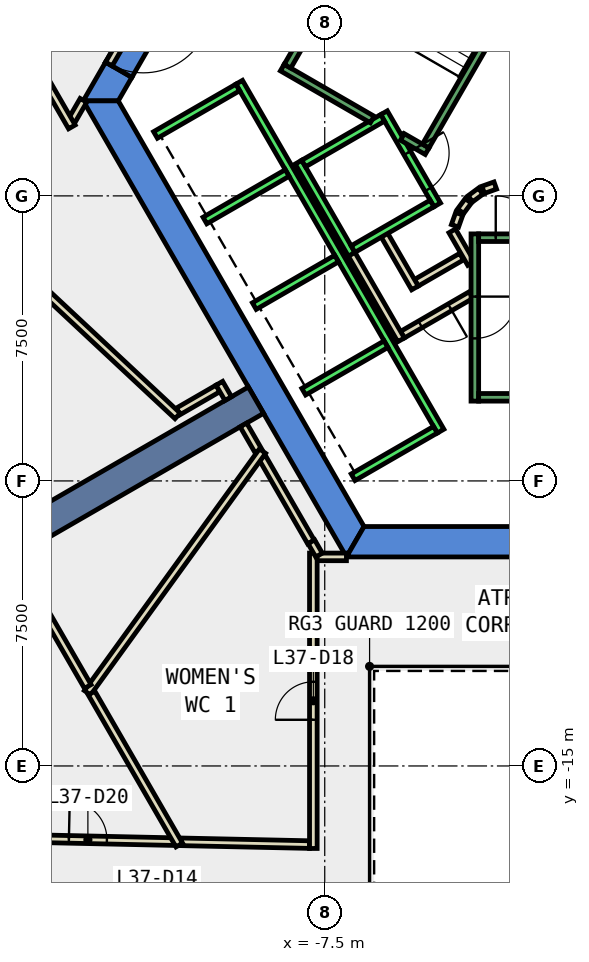
"""IFC4 building model, lengths in metres.
Left out: names, types, materials, properties, quantities, classifications, styles, units other than length and angle.
Written with IfcOpenShell. Run it as: python <this file> out.ifc"""

import sys

from ifc_helpers import new_model, si_unit, direction, frame, frame_2d, origin, place, context, subcontext, project, spatial, polyline, rectangle, outline, extrude, element, fill, save


model = new_model("IFC4")
c1 = context("Model", 3, precision=1e-05, world=origin(), true_north=direction((0.0, 1.0)))
c2 = subcontext(c1, "Body", "Model", "MODEL_VIEW")
j1 = project(units=[si_unit("LENGTHUNIT", "METRE"), si_unit("PLANEANGLEUNIT", "RADIAN")], contexts=[c1])
p1 = place(None, origin())
s1 = spatial("IfcSite", under=j1, at=p1, CompositionType="ELEMENT")
p2 = place(p1, origin())
s2 = spatial("IfcBuilding", under=s1, at=p2, CompositionType="ELEMENT")
p3 = place(p2, frame((0.0, 0.0, 167.6)))
s3 = spatial("IfcBuildingStorey", under=s2, at=p3, CompositionType="ELEMENT", Elevation=167.6)
p4 = place(p3, frame((0.0, 0.0, -0.4)))
e1 = element("IfcWall", 1, at=p4, inside=s3, PredefinedType="SHEAR", context=c2, shape_type="SweptSolid", body=[
    extrude(outline(polyline([(-12.575, 3.12), (-13.267, 3.52), (-13.856, 2.5), (-12.933, 2.5), (-12.575, 3.12)])), origin(), (0.0, 0.0, 1.0), 4.2),
])
p5 = place(p3, frame((0.0, 0.0, 3.6)))
e2 = element("IfcWall", 2, at=p5, inside=s3, PredefinedType="SHEAR", context=c2, shape_type="SweptSolid", body=[
    extrude(outline(polyline([(-13.267, 3.52), (-12.575, 3.12), (-11.575, 4.852), (-12.267, 5.252), (-13.267, 3.52)])), origin(), (0.0, 0.0, 1.0), 0.2),
])
p6 = place(p3, frame((0.0, 0.0, -0.4)))
e3 = element("IfcWall", 3, at=p6, inside=s3, PredefinedType="SHEAR", context=c2, shape_type="SweptSolid", body=[
    extrude(outline(polyline([(-13.856, 2.5), (-6.928, -9.5), (-6.466, -8.7), (-12.933, 2.5), (-13.856, 2.5)])), origin(), (0.0, 0.0, 1.0), 4.2),
])
p7 = place(p3, frame((0.0, 0.0, -0.4)))
e4 = element("IfcWall", 4, at=p7, inside=s3, PredefinedType="SHEAR", context=c2, shape_type="SweptSolid", body=[
    extrude(outline(polyline([(3.75, -9.5), (3.75, -8.7), (-6.466, -8.7), (-6.928, -9.5), (3.75, -9.5)])), origin(), (0.0, 0.0, 1.0), 4.2),
])
p8 = place(p3, frame((-9.31, -5.375, -0.4), z_axis=(0.0, 0.0, 1.0), x_axis=(-0.866017533419, -0.500013631625, 0.0)))
e5 = element("IfcWall", 5, at=p8, inside=s3, PredefinedType="SHEAR", context=c2, shape_type="SweptSolid", body=[
    extrude(rectangle(XDim=9.0, YDim=0.8, at=frame_2d((4.5, 0.0))), origin(), (0.0, 0.0, 1.0), 4.2),
])
p9 = place(p3, frame((-13.85, 2.514, 0.0), z_axis=(0.0, 0.0, 1.0), x_axis=(-0.500418219013, -0.865783810244, 0.0)))
e6 = element("IfcWall", 6, at=p9, inside=s3, PredefinedType="PARTITIONING", context=c2, shape_type="SweptSolid", body=[
    extrude(rectangle(XDim=0.607, YDim=0.2, at=frame_2d((0.304, 0.0))), origin(), (0.0, 0.0, 1.0), 3.8),
])
p10 = place(p3, frame((-14.154, 1.815, 0.0), z_axis=(0.0, 0.0, 1.0), x_axis=(-0.500038857296, 0.866002968352, 0.0)))
e7 = element("IfcWall", 7, at=p10, inside=s3, PredefinedType="PARTITIONING", context=c2, shape_type="SweptSolid", body=[
    extrude(rectangle(XDim=3.34, YDim=0.2, at=frame_2d((1.67, 0.0))), origin(), (0.0, 0.0, 1.0), 3.8),
])
p11 = place(p3, frame((-11.278, -16.996, 0.0), z_axis=(0.0, 0.0, 1.0), x_axis=(0.999766613119, -0.021603687022, 0.0)))
e8 = element("IfcWall", 8, at=p11, inside=s3, PredefinedType="PARTITIONING", context=c2, shape_type="SweptSolid", body=[
    extrude(rectangle(XDim=3.379, YDim=0.2, at=frame_2d((1.689, 0.0))), origin(), (0.0, 0.0, 1.0), 3.8),
])
p12 = place(p3, frame((-15.987, -16.893, 0.0), z_axis=(0.0, 0.0, 1.0), x_axis=(0.999764376572, -0.021706942174, 0.0)))
e9 = element("IfcWall", 9, at=p12, inside=s3, PredefinedType="PARTITIONING", context=c2, shape_type="SweptSolid", body=[
    extrude(rectangle(XDim=4.51, YDim=0.2, at=frame_2d((2.255, 0.0))), origin(), (0.0, 0.0, 1.0), 3.8),
])
p13 = place(p12, frame((1.755, 0.0, 0.0)))
e10 = element("IfcOpeningElement", 10, at=p13, cuts=e9, PredefinedType="OPENING", context=c2, shape_type="SweptSolid", body=[
    extrude(rectangle(XDim=1.0, YDim=2.1, at=frame_2d((0.5, 1.05))), frame((0.0, 0.11, 0.0), z_axis=(0.0, -1.0, 0.0), x_axis=(1.0, 0.0, 0.0)), (0.0, 0.0, 1.0), 0.22),
])
p14 = place(p3, frame((-3.9, -1.599, 0.0), z_axis=(0.0, 0.0, 1.0), x_axis=(-0.865969445389, -0.500096910261, 0.0)))
e11 = element("IfcWall", 11, at=p14, inside=s3, PredefinedType="PARTITIONING", context=c2, shape_type="SweptSolid", body=[
    extrude(rectangle(XDim=1.373, YDim=0.2, at=frame_2d((0.687, 0.0))), origin(), (0.0, 0.0, 1.0), 3.8),
])
p15 = place(p3, frame((-5.126, -2.422, 0.0), z_axis=(0.0, 0.0, 1.0), x_axis=(-0.500062241894, 0.865989465428, 0.0)))
e12 = element("IfcWall", 12, at=p15, inside=s3, PredefinedType="PARTITIONING", context=c2, shape_type="SweptSolid", body=[
    extrude(rectangle(XDim=1.7, YDim=0.2, at=frame_2d((0.85, 0.0))), origin(), (0.0, 0.0, 1.0), 3.8),
])
p16 = place(p3, frame((-3.65, -2.61, 0.0), z_axis=(0.0, 0.0, 1.0), x_axis=(-0.866072462134, -0.499918483688, 0.0)))
e13 = element("IfcWall", 13, at=p16, inside=s3, PredefinedType="PARTITIONING", context=c2, shape_type="SweptSolid", body=[
    extrude(rectangle(XDim=2.084, YDim=0.2, at=frame_2d((1.042, 0.0))), origin(), (0.0, 0.0, 1.0), 3.8),
])
p17 = place(p16, frame((0.642, 0.0, 0.0)))
e14 = element("IfcOpeningElement", 14, at=p17, cuts=e13, PredefinedType="OPENING", context=c2, shape_type="SweptSolid", body=[
    extrude(rectangle(XDim=0.9, YDim=2.1, at=frame_2d((0.45, 1.05))), frame((0.0, 0.11, 0.0), z_axis=(0.0, -1.0, 0.0), x_axis=(1.0, 0.0, 0.0)), (0.0, 0.0, 1.0), 0.22),
])
p18 = place(p3, frame((-5.492, -3.788, 0.0), z_axis=(0.0, 0.0, 1.0), x_axis=(-0.500008949224, 0.866020236886, 0.0)))
e15 = element("IfcWall", 15, at=p18, inside=s3, PredefinedType="PARTITIONING", context=c2, shape_type="SweptSolid", body=[
    extrude(rectangle(XDim=2.68, YDim=0.2, at=frame_2d((1.34, 0.0))), origin(), (0.0, 0.0, 1.0), 3.8),
])
p19 = place(p3, frame((-4.145, -0.92, 0.0), z_axis=(0.0, 0.0, 1.0), x_axis=(0.499743786207, -0.866173278362, 0.0)))
e16 = element("IfcWall", 16, at=p19, inside=s3, PredefinedType="PARTITIONING", context=c2, shape_type="SweptSolid", body=[
    extrude(rectangle(XDim=0.991, YDim=0.2, at=frame_2d((0.495, 0.0))), origin(), (0.0, 0.0, 1.0), 3.8),
])
p20 = place(p3, frame((-2.771, 4.7, 0.0), z_axis=(0.0, 0.0, 1.0), x_axis=(0.499969479948, -0.866043023828, 0.0)))
e17 = element("IfcWall", 17, at=p20, inside=s3, PredefinedType="PARTITIONING", context=c2, shape_type="SweptSolid", body=[
    extrude(rectangle(XDim=4.99, YDim=0.2, at=frame_2d((2.495, 0.0))), origin(), (0.0, 0.0, 1.0), 3.8),
])
p21 = place(p20, frame((1.945, 0.0, 0.0)))
e18 = element("IfcOpeningElement", 18, at=p21, cuts=e17, PredefinedType="OPENING", context=c2, shape_type="SweptSolid", body=[
    extrude(rectangle(XDim=1.0, YDim=2.1, at=frame_2d((0.5, 1.05))), frame((0.0, 0.11, 0.0), z_axis=(0.0, -1.0, 0.0), x_axis=(1.0, 0.0, 0.0)), (0.0, 0.0, 1.0), 0.22),
])
p22 = place(p3, frame((-3.012, 0.273, 0.0), z_axis=(0.0, 0.0, 1.0), x_axis=(-0.942280615813, -0.334824194261, 0.0)))
e19 = element("IfcWall", 19, at=p22, inside=s3, PredefinedType="PARTITIONING", context=c2, shape_type="SweptSolid", body=[
    extrude(rectangle(XDim=0.338, YDim=0.2, at=frame_2d((0.169, 0.0))), origin(), (0.0, 0.0, 1.0), 3.8),
])
p23 = place(p3, frame((-3.397, 0.124, 0.0), z_axis=(0.0, 0.0, 1.0), x_axis=(-0.804311165252, -0.594208338422, 0.0)))
e20 = element("IfcWall", 20, at=p23, inside=s3, PredefinedType="PARTITIONING", context=c2, shape_type="SweptSolid", body=[
    extrude(rectangle(XDim=0.338, YDim=0.2, at=frame_2d((0.169, 0.0))), origin(), (0.0, 0.0, 1.0), 3.8),
])
p24 = place(p3, frame((-3.723, -0.131, 0.0), z_axis=(0.0, 0.0, 1.0), x_axis=(-0.594675113454, -0.803966112121, 0.0)))
e21 = element("IfcWall", 21, at=p24, inside=s3, PredefinedType="PARTITIONING", context=c2, shape_type="SweptSolid", body=[
    extrude(rectangle(XDim=0.338, YDim=0.2, at=frame_2d((0.169, 0.0))), origin(), (0.0, 0.0, 1.0), 3.8),
])
p25 = place(p3, frame((-3.96, -0.47, 0.0), z_axis=(0.0, 0.0, 1.0), x_axis=(-0.334824194261, -0.942280615813, 0.0)))
e22 = element("IfcWall", 22, at=p25, inside=s3, PredefinedType="PARTITIONING", context=c2, shape_type="SweptSolid", body=[
    extrude(rectangle(XDim=0.338, YDim=0.2, at=frame_2d((0.169, 0.0))), origin(), (0.0, 0.0, 1.0), 3.8),
])
p26 = place(p3, frame((-7.722, -9.499, 0.0), z_axis=(0.0, 0.0, 1.0), x_axis=(1.0, 0.0, 0.0)))
e23 = element("IfcWall", 23, at=p26, inside=s3, PredefinedType="PARTITIONING", context=c2, shape_type="SweptSolid", body=[
    extrude(rectangle(XDim=0.793, YDim=0.2, at=frame_2d((0.396, 0.0))), origin(), (0.0, 0.0, 1.0), 3.8),
])
p27 = place(p3, frame((-7.8, -17.171, 0.0), z_axis=(0.0, 0.0, 1.0), x_axis=(0.0, 1.0, 0.0)))
e24 = element("IfcWall", 24, at=p27, inside=s3, PredefinedType="PARTITIONING", context=c2, shape_type="SweptSolid", body=[
    extrude(rectangle(XDim=7.772, YDim=0.2, at=frame_2d((3.886, 0.0))), origin(), (0.0, 0.0, 1.0), 3.8),
])
p28 = place(p27, frame((3.386, 0.0, 0.0)))
e25 = element("IfcOpeningElement", 25, at=p28, cuts=e24, PredefinedType="OPENING", context=c2, shape_type="SweptSolid", body=[
    extrude(rectangle(XDim=1.0, YDim=2.1, at=frame_2d((0.5, 1.05))), frame((0.0, 0.11, 0.0), z_axis=(0.0, -1.0, 0.0), x_axis=(1.0, 0.0, 0.0)), (0.0, 0.0, 1.0), 0.22),
])
p29 = place(p3, frame((-7.862, -9.107, 0.0), z_axis=(0.0, 0.0, 1.0), x_axis=(-0.499994038704, 0.866028845513, 0.0)))
e26 = element("IfcWall", 26, at=p29, inside=s3, PredefinedType="PARTITIONING", context=c2, shape_type="SweptSolid", body=[
    extrude(rectangle(XDim=2.568, YDim=0.2, at=frame_2d((1.284, 0.0))), origin(), (0.0, 0.0, 1.0), 3.8),
])
p30 = place(p3, frame((-7.65, -9.451, 0.0), z_axis=(0.0, 0.0, 1.0), x_axis=(-0.500297731093, 0.865853440406, 0.0)))
e27 = element("IfcWall", 27, at=p30, inside=s3, PredefinedType="PARTITIONING", context=c2, shape_type="SweptSolid", body=[
    extrude(rectangle(XDim=0.404, YDim=0.2, at=frame_2d((0.202, 0.0))), origin(), (0.0, 0.0, 1.0), 3.8),
])
p31 = place(p3, frame((-9.246, -6.71, 0.0), z_axis=(0.0, 0.0, 1.0), x_axis=(-0.499570510076, 0.86627322795, 0.0)))
e28 = element("IfcWall", 28, at=p31, inside=s3, PredefinedType="PARTITIONING", context=c2, shape_type="SweptSolid", body=[
    extrude(rectangle(XDim=0.788, YDim=0.2, at=frame_2d((0.394, 0.0))), origin(), (0.0, 0.0, 1.0), 3.8),
])
p32 = place(p3, frame((-10.31, -5.066, 0.0), z_axis=(0.0, 0.0, 1.0), x_axis=(-0.865587329375, -0.500758000661, 0.0)))
e29 = element("IfcWall", 29, at=p32, inside=s3, PredefinedType="PARTITIONING", context=c2, shape_type="SweptSolid", body=[
    extrude(rectangle(XDim=1.21, YDim=0.2, at=frame_2d((0.605, 0.0))), origin(), (0.0, 0.0, 1.0), 3.8),
])
p33 = place(p3, frame((-11.372, -5.79, 0.0), z_axis=(0.0, 0.0, 1.0), x_axis=(-0.730922728623, 0.682460229451, 0.0)))
e30 = element("IfcWall", 30, at=p33, inside=s3, PredefinedType="PARTITIONING", context=c2, shape_type="SweptSolid", body=[
    extrude(rectangle(XDim=9.924, YDim=0.2, at=frame_2d((4.962, 0.0))), origin(), (0.0, 0.0, 1.0), 3.8),
])
p34 = place(p3, frame((-13.744, -13.076, 0.0), z_axis=(0.0, 0.0, 1.0), x_axis=(0.586577314901, 0.809893235953, 0.0)))
e31 = element("IfcWall", 31, at=p34, inside=s3, PredefinedType="PARTITIONING", context=c2, shape_type="SweptSolid", body=[
    extrude(rectangle(XDim=7.854, YDim=0.2, at=frame_2d((3.927, 0.0))), origin(), (0.0, 0.0, 1.0), 3.8),
])
p35 = place(p3, frame((-11.328, -17.08, 0.0), z_axis=(0.0, 0.0, 1.0), x_axis=(-0.499972710878, 0.866041158593, 0.0)))
e32 = element("IfcWall", 32, at=p35, inside=s3, PredefinedType="PARTITIONING", context=c2, shape_type="SweptSolid", body=[
    extrude(rectangle(XDim=4.616, YDim=0.2, at=frame_2d((2.308, 0.0))), origin(), (0.0, 0.0, 1.0), 3.8),
])
p36 = place(p3, frame((-13.736, -12.909, 0.0), z_axis=(0.0, 0.0, 1.0), x_axis=(-0.49990810406, 0.866078453429, 0.0)))
e33 = element("IfcWall", 33, at=p36, inside=s3, PredefinedType="PARTITIONING", context=c2, shape_type="SweptSolid", body=[
    extrude(rectangle(XDim=3.908, YDim=0.2, at=frame_2d((1.954, 0.0))), origin(), (0.0, 0.0, 1.0), 3.8),
])
p37 = place(p3, frame((-12.18, 5.202, 0.0), z_axis=(0.0, 0.0, 1.0), x_axis=(-0.50002537861, -0.866010750942, 0.0)))
e34 = element("IfcWall", 34, at=p37, inside=s3, PredefinedType="PARTITIONING", context=c2, shape_type="SweptSolid", body=[
    extrude(rectangle(XDim=2.0, YDim=0.2, at=frame_2d((1.0, 0.0))), origin(), (0.0, 0.0, 1.0), 2.4),
])
p38 = place(p37, frame((0.19, 0.0, 0.0)))
e35 = element("IfcOpeningElement", 35, at=p38, cuts=e34, PredefinedType="OPENING", context=c2, shape_type="SweptSolid", body=[
    extrude(rectangle(XDim=1.8, YDim=2.1, at=frame_2d((0.9, 1.05))), frame((0.0, 0.11, 0.0), z_axis=(0.0, -1.0, 0.0), x_axis=(1.0, 0.0, 0.0)), (0.0, 0.0, 1.0), 0.22),
])
p39 = place(p3, frame((-10.04, -5.334, 0.0), z_axis=(0.0, 0.0, 1.0), x_axis=(-0.499405191234, 0.86636854454, 0.0)))
e36 = element("IfcWall", 36, at=p39, inside=s3, PredefinedType="PARTITIONING", context=c2, shape_type="SweptSolid", body=[
    extrude(rectangle(XDim=0.466, YDim=0.2, at=frame_2d((0.233, 0.0))), origin(), (0.0, 0.0, 1.0), 3.8),
])
p40 = place(p3, frame((-5.94, 2.188, 0.0), z_axis=(0.0, 0.0, 1.0), x_axis=(0.49994636267, -0.866056369097, 0.0)))
e37 = element("IfcWall", 37, at=p40, inside=s3, PredefinedType="STANDARD", context=c2, shape_type="SweptSolid", body=[
    extrude(rectangle(XDim=2.8, YDim=0.2, at=frame_2d((1.4, 0.0))), origin(), (0.0, 0.0, 1.0), 3.8),
])
p41 = place(p40, frame((1.225, 0.0, 0.0)))
e38 = element("IfcOpeningElement", 38, at=p41, cuts=e37, PredefinedType="OPENING", context=c2, shape_type="SweptSolid", body=[
    extrude(rectangle(XDim=1.1, YDim=2.1, at=frame_2d((0.55, 1.05))), frame((0.0, 0.11, 0.0), z_axis=(0.0, -1.0, 0.0), x_axis=(1.0, 0.0, 0.0)), (0.0, 0.0, 1.0), 0.22),
])
p42 = place(p3, frame((-8.192, 0.888, 0.0), z_axis=(0.0, 0.0, 1.0), x_axis=(0.49994636267, -0.866056369097, 0.0)))
e39 = element("IfcWall", 39, at=p42, inside=s3, PredefinedType="STANDARD", context=c2, shape_type="SweptSolid", body=[
    extrude(rectangle(XDim=2.8, YDim=0.2, at=frame_2d((1.4, 0.0))), origin(), (0.0, 0.0, 1.0), 3.8),
])
for number, where, z_axis, x_axis in (
    (40, (-5.977, 2.052, 0.0), (0.0, 0.0, 1.0), (-0.866, -0.5, 0.0)),
    (41, (-4.677, -0.2, 0.0), (0.0, 0.0, 1.0), (-0.866, -0.5, 0.0)),
):
    element("IfcWall", number, at=place(p3, frame(where, z_axis=z_axis, x_axis=x_axis)), inside=s3, PredefinedType="STANDARD", context=c2, shape_type="SweptSolid", body=[
        extrude(rectangle(XDim=2.399, YDim=0.2, at=frame_2d((1.2, 0.0))), origin(), (0.0, 0.0, 1.0), 3.8),
    ])
p43 = place(p3, frame((-9.751, 2.99, 0.0), z_axis=(0.0, 0.0, 1.0), x_axis=(0.50000090737, -0.866024879913, 0.0)))
e42 = element("IfcWall", 42, at=p43, inside=s3, PredefinedType="STANDARD", context=c2, shape_type="SweptSolid", body=[
    extrude(rectangle(XDim=10.6, YDim=0.2, at=frame_2d((5.3, 0.0))), origin(), (0.0, 0.0, 1.0), 3.8),
])
p44 = place(p3, frame((-9.788, 2.853, 0.0), z_axis=(0.0, 0.0, 1.0), x_axis=(-0.865998541277, -0.500046524342, 0.0)))
e43 = element("IfcWall", 43, at=p44, inside=s3, PredefinedType="STANDARD", context=c2, shape_type="SweptSolid", body=[
    extrude(rectangle(XDim=2.5, YDim=0.2, at=frame_2d((1.25, 0.0))), origin(), (0.0, 0.0, 1.0), 3.8),
])
for number, where, z_axis, x_axis in (
    (44, (-8.488, 0.602, 0.0), (0.0, 0.0, 1.0), (-0.866, -0.5, 0.0)),
    (45, (-7.188, -1.65, 0.0), (0.0, 0.0, 1.0), (-0.866, -0.5, 0.0)),
    (46, (-5.888, -3.902, 0.0), (0.0, 0.0, 1.0), (-0.866, -0.5, 0.0)),
    (47, (-4.588, -6.153, 0.0), (0.0, 0.0, 1.0), (-0.866, -0.5, 0.0)),
):
    element("IfcWall", number, at=place(p3, frame(where, z_axis=z_axis, x_axis=x_axis)), inside=s3, PredefinedType="STANDARD", context=c2, shape_type="SweptSolid", body=[
        extrude(rectangle(XDim=2.5, YDim=0.2, at=frame_2d((1.25, 0.0))), origin(), (0.0, 0.0, 1.0), 3.8),
    ])
p45 = place(p3, frame((-3.55, -1.0, 0.0), z_axis=(0.0, 0.0, 1.0), x_axis=(0.0, -1.0, 0.0)))
e48 = element("IfcWall", 48, at=p45, inside=s3, PredefinedType="STANDARD", context=c2, shape_type="SweptSolid", body=[
    extrude(rectangle(XDim=4.4, YDim=0.2, at=frame_2d((2.2, 0.0))), origin(), (0.0, 0.0, 1.0), 3.8),
])
p46 = place(p45, frame((1.65, 0.0, 0.0)))
e49 = element("IfcOpeningElement", 49, at=p46, cuts=e48, PredefinedType="OPENING", context=c2, shape_type="SweptSolid", body=[
    extrude(rectangle(XDim=1.1, YDim=2.2, at=frame_2d((0.55, 1.1))), frame((0.0, 0.11, 0.0), z_axis=(0.0, -1.0, 0.0), x_axis=(1.0, 0.0, 0.0)), (0.0, 0.0, 1.0), 0.22),
])
p47 = place(p3, frame((-3.45, -1.1, 0.0), z_axis=(0.0, 0.0, 1.0), x_axis=(1.0, 0.0, 0.0)))
e50 = element("IfcWall", 50, at=p47, inside=s3, PredefinedType="STANDARD", context=c2, shape_type="SweptSolid", body=[
    extrude(rectangle(XDim=6.9, YDim=0.2, at=frame_2d((3.45, 0.0))), origin(), (0.0, 0.0, 1.0), 3.8),
])
p48 = place(p47, frame((0.45, 0.0, 0.0)))
e51 = element("IfcOpeningElement", 51, at=p48, cuts=e50, PredefinedType="OPENING", context=c2, shape_type="SweptSolid", body=[
    extrude(rectangle(XDim=1.1, YDim=2.2, at=frame_2d((0.55, 1.1))), frame((0.0, 0.11, 0.0), z_axis=(0.0, -1.0, 0.0), x_axis=(1.0, 0.0, 0.0)), (0.0, 0.0, 1.0), 0.22),
])
p49 = place(p3, frame((-3.45, -5.3, 0.0), z_axis=(0.0, 0.0, 1.0), x_axis=(1.0, 0.0, 0.0)))
e52 = element("IfcWall", 52, at=p49, inside=s3, PredefinedType="STANDARD", context=c2, shape_type="SweptSolid", body=[
    extrude(rectangle(XDim=6.9, YDim=0.2, at=frame_2d((3.45, 0.0))), origin(), (0.0, 0.0, 1.0), 3.8),
])
p50 = place(p3, frame((-6.25, 2.01, 0.0), z_axis=(0.0, 0.0, 1.0), x_axis=(-0.86611865017, 0.499838457731, 0.0)))
e53 = element("IfcWall", 53, at=p50, inside=s3, PredefinedType="STANDARD", context=c2, shape_type="SweptSolid", body=[
    extrude(rectangle(XDim=2.733, YDim=0.2, at=frame_2d((1.366, 0.0))), origin(), (0.0, 0.0, 1.0), 3.8),
])
p51 = place(p3, frame((-4.806, 1.176, 0.0), z_axis=(0.0, 0.0, 1.0), x_axis=(-0.866558586415, 0.499075361355, 0.0)))
e54 = element("IfcWall", 54, at=p51, inside=s3, PredefinedType="STANDARD", context=c2, shape_type="SweptSolid", body=[
    extrude(rectangle(XDim=0.751, YDim=0.2, at=frame_2d((0.376, 0.0))), origin(), (0.0, 0.0, 1.0), 3.8),
])
p52 = place(p3, frame((-1.393, 7.288, 0.0), z_axis=(0.0, 0.0, 1.0), x_axis=(-0.499963383562, -0.866046543262, 0.0)))
e55 = element("IfcWall", 55, at=p52, inside=s3, PredefinedType="STANDARD", context=c2, shape_type="SweptSolid", body=[
    extrude(rectangle(XDim=6.9, YDim=0.2, at=frame_2d((3.45, 0.0))), origin(), (0.0, 0.0, 1.0), 3.8),
])
p53 = place(p52, frame((0.45, 0.0, 0.0)))
e56 = element("IfcOpeningElement", 56, at=p53, cuts=e55, PredefinedType="OPENING", context=c2, shape_type="SweptSolid", body=[
    extrude(rectangle(XDim=1.1, YDim=2.2, at=frame_2d((0.55, 1.1))), frame((0.0, 0.11, 0.0), z_axis=(0.0, -1.0, 0.0), x_axis=(1.0, 0.0, 0.0)), (0.0, 0.0, 1.0), 0.22),
])
p54 = place(p3, frame((-5.03, 9.388, 0.0), z_axis=(0.0, 0.0, 1.0), x_axis=(-0.499978703459, -0.866037698999, 0.0)))
e57 = element("IfcWall", 57, at=p54, inside=s3, PredefinedType="STANDARD", context=c2, shape_type="SweptSolid", body=[
    extrude(rectangle(XDim=6.9, YDim=0.2, at=frame_2d((3.45, 0.0))), origin(), (0.0, 0.0, 1.0), 3.8),
])
p55 = place(p28, origin())
e58 = element("IfcDoor", 58, at=p55, inside=s3, OperationType="SINGLE_SWING_LEFT", PredefinedType="DOOR", context=c2, shape_type="SweptSolid", body=[
    extrude(rectangle(XDim=1.0, YDim=2.1, at=frame_2d((0.5, 1.05))), frame((0.0, 0.025, 0.0), z_axis=(0.0, -1.0, 0.0), x_axis=(1.0, 0.0, 0.0)), (0.0, 0.0, 1.0), 0.05),
])
fill(e25, e58)
p56 = place(p13, origin())
e59 = element("IfcDoor", 59, at=p56, inside=s3, OperationType="SINGLE_SWING_LEFT", PredefinedType="DOOR", context=c2, shape_type="SweptSolid", body=[
    extrude(rectangle(XDim=1.0, YDim=2.1, at=frame_2d((0.5, 1.05))), frame((0.0, 0.025, 0.0), z_axis=(0.0, -1.0, 0.0), x_axis=(1.0, 0.0, 0.0)), (0.0, 0.0, 1.0), 0.05),
])
fill(e10, e59)
p57 = place(p17, origin())
e60 = element("IfcDoor", 60, at=p57, inside=s3, OperationType="SINGLE_SWING_LEFT", PredefinedType="DOOR", context=c2, shape_type="SweptSolid", body=[
    extrude(rectangle(XDim=0.9, YDim=2.1, at=frame_2d((0.45, 1.05))), frame((0.0, 0.025, 0.0), z_axis=(0.0, -1.0, 0.0), x_axis=(1.0, 0.0, 0.0)), (0.0, 0.0, 1.0), 0.05),
])
fill(e14, e60)
p58 = place(p38, origin())
e61 = element("IfcDoor", 61, at=p58, inside=s3, OperationType="DOUBLE_DOOR_SINGLE_SWING", PredefinedType="DOOR", context=c2, shape_type="SweptSolid", body=[
    extrude(rectangle(XDim=1.8, YDim=2.1, at=frame_2d((0.9, 1.05))), frame((0.0, 0.025, 0.0), z_axis=(0.0, -1.0, 0.0), x_axis=(1.0, 0.0, 0.0)), (0.0, 0.0, 1.0), 0.05),
])
fill(e35, e61)
p59 = place(p41, origin())
e62 = element("IfcDoor", 62, at=p59, inside=s3, OperationType="SLIDING_TO_LEFT", PredefinedType="DOOR", context=c2, shape_type="SweptSolid", body=[
    extrude(rectangle(XDim=1.1, YDim=2.1, at=frame_2d((0.55, 1.05))), frame((0.0, 0.025, 0.0), z_axis=(0.0, -1.0, 0.0), x_axis=(1.0, 0.0, 0.0)), (0.0, 0.0, 1.0), 0.05),
])
fill(e38, e62)
p60 = place(p48, origin())
e63 = element("IfcDoor", 63, at=p60, inside=s3, OperationType="SINGLE_SWING_LEFT", PredefinedType="DOOR", context=c2, shape_type="SweptSolid", body=[
    extrude(rectangle(XDim=1.1, YDim=2.2, at=frame_2d((0.55, 1.1))), frame((0.0, 0.025, 0.0), z_axis=(0.0, -1.0, 0.0), x_axis=(1.0, 0.0, 0.0)), (0.0, 0.0, 1.0), 0.05),
])
fill(e51, e63)
p61 = place(p46, origin())
e64 = element("IfcDoor", 64, at=p61, inside=s3, OperationType="SINGLE_SWING_LEFT", PredefinedType="DOOR", context=c2, shape_type="SweptSolid", body=[
    extrude(rectangle(XDim=1.1, YDim=2.2, at=frame_2d((0.55, 1.1))), frame((0.0, 0.025, 0.0), z_axis=(0.0, -1.0, 0.0), x_axis=(1.0, 0.0, 0.0)), (0.0, 0.0, 1.0), 0.05),
])
fill(e49, e64)
save(model, sys.argv[1])
